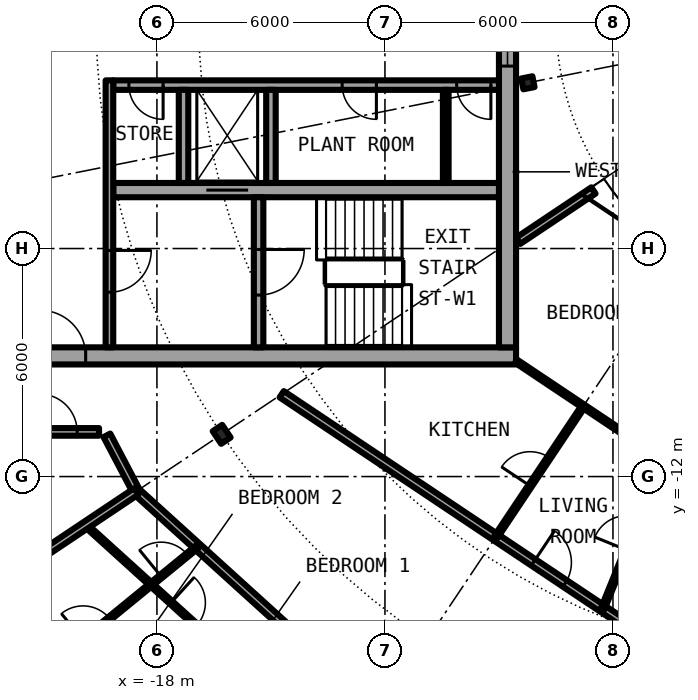
"""IFC4 building model, lengths in metres.
Left out: names, types, materials, properties, quantities, classifications, styles, units other than length and angle.
Written with IfcOpenShell. Run it as: python <this file> out.ifc"""

import sys

from ifc_helpers import new_model, si_unit, direction, frame, frame_2d, origin, origin_2d, place, context, subcontext, project, spatial, rectangle, i_section, extrude, element, fill, save


model = new_model("IFC4")
c1 = context("Model", 3, precision=1e-05, world=origin(), true_north=direction((0.0, 1.0)))
c2 = subcontext(c1, "Body", "Model", "MODEL_VIEW")
j1 = project(units=[si_unit("LENGTHUNIT", "METRE"), si_unit("PLANEANGLEUNIT", "RADIAN")], contexts=[c1])
p1 = place(None, origin())
s1 = spatial("IfcSite", under=j1, at=p1, CompositionType="ELEMENT")
p2 = place(p1, origin())
s2 = spatial("IfcBuilding", under=s1, at=p2, CompositionType="ELEMENT")
p3 = place(p2, frame((0.0, 0.0, 190.2)))
s3 = spatial("IfcBuildingStorey", under=s2, at=p3, CompositionType="ELEMENT", Elevation=190.2)
p4 = place(p3, frame((-16.297, -10.889, 0.0), z_axis=(0.0, 0.0, 1.0), x_axis=(-0.831469612303, -0.55557023302, 0.0)))
e1 = element("IfcColumn", 1, at=p4, inside=s3, PredefinedType="COLUMN", context=c2, shape_type="SweptSolid", body=[
    extrude(i_section(OverallWidth=0.3, OverallDepth=0.4, WebThickness=0.013, FlangeThickness=0.024, FilletRadius=0.027, at=origin_2d()), origin(), (0.0, 0.0, 1.0), 3.05),
])
p5 = place(p3, frame((-8.239, -1.639, 0.0), z_axis=(0.0, 0.0, 1.0), x_axis=(-0.980785280403, -0.195090322016, 0.0)))
e2 = element("IfcColumn", 2, at=p5, inside=s3, PredefinedType="COLUMN", context=c2, shape_type="SweptSolid", body=[
    extrude(i_section(OverallWidth=0.3, OverallDepth=0.29, WebThickness=0.009, FlangeThickness=0.014, FilletRadius=0.027, at=origin_2d()), origin(), (0.0, 0.0, 1.0), 3.05),
])
p6 = place(p3, frame((-22.699, -15.167, 0.0), z_axis=(0.0, 0.0, 1.0), x_axis=(0.634382322723, -0.773019449054, 0.0)))
e3 = element("IfcWall", 3, at=p6, inside=s3, PredefinedType="SOLIDWALL", context=c2, shape_type="SweptSolid", body=[
    extrude(rectangle(XDim=5.352, YDim=0.25, at=frame_2d((2.676, 0.0))), origin(), (0.0, 0.0, 1.0), 2.7),
])
p7 = place(p6, frame((0.841, 0.0, 0.0)))
e4 = element("IfcOpeningElement", 4, at=p7, cuts=e3, PredefinedType="OPENING", context=c2, shape_type="SweptSolid", body=[
    extrude(rectangle(XDim=1.0, YDim=2.2, at=frame_2d((0.5, 1.1))), frame((0.0, 0.135, 0.0), z_axis=(0.0, -1.0, 0.0), x_axis=(1.0, 0.0, 0.0)), (0.0, 0.0, 1.0), 0.27),
])
p8 = place(p6, frame((3.111, 0.0, 0.3)))
e5 = element("IfcOpeningElement", 5, at=p8, cuts=e3, PredefinedType="OPENING", context=c2, shape_type="SweptSolid", body=[
    extrude(rectangle(XDim=1.8, YDim=2.1, at=frame_2d((0.9, 1.05))), frame((0.0, 0.135, 0.0), z_axis=(0.0, -1.0, 0.0), x_axis=(1.0, 0.0, 0.0)), (0.0, 0.0, 1.0), 0.27),
])
p9 = place(p3, frame((-22.05, -8.825, 0.0), z_axis=(0.0, 0.0, 1.0), x_axis=(1.0, 0.0, 0.0)))
e6 = element("IfcWall", 6, at=p9, inside=s3, PredefinedType="SHEAR", context=c2, shape_type="SweptSolid", body=[
    extrude(rectangle(XDim=13.5, YDim=0.45, at=frame_2d((6.75, 0.0))), origin(), (0.0, 0.0, 1.0), 3.05),
])
p10 = place(p9, frame((0.975, 0.0, 0.0)))
e7 = element("IfcOpeningElement", 7, at=p10, cuts=e6, PredefinedType="OPENING", context=c2, shape_type="SweptSolid", body=[
    extrude(rectangle(XDim=1.2, YDim=2.3, at=frame_2d((0.6, 1.15))), frame((0.0, 0.235, 0.0), z_axis=(0.0, -1.0, 0.0), x_axis=(1.0, 0.0, 0.0)), (0.0, 0.0, 1.0), 0.47),
])
p11 = place(p3, frame((-8.775, 8.6, 0.0), z_axis=(0.0, 0.0, 1.0), x_axis=(0.0, -1.0, 0.0)))
e8 = element("IfcWall", 8, at=p11, inside=s3, PredefinedType="SHEAR", context=c2, shape_type="SweptSolid", body=[
    extrude(rectangle(XDim=17.2, YDim=0.45, at=frame_2d((8.6, 0.0))), origin(), (0.0, 0.0, 1.0), 3.05),
])
p12 = place(p11, frame((7.4, 0.0, 0.1)))
e9 = element("IfcOpeningElement", 9, at=p12, cuts=e8, PredefinedType="OPENING", context=c2, shape_type="SweptSolid", body=[
    extrude(rectangle(XDim=2.4, YDim=2.2, at=frame_2d((1.2, 1.1))), frame((0.0, 0.235, 0.0), z_axis=(0.0, -1.0, 0.0), x_axis=(1.0, 0.0, 0.0)), (0.0, 0.0, 1.0), 0.47),
])
p13 = place(p3, frame((-9.0, -1.7, 0.0), z_axis=(0.0, 0.0, 1.0), x_axis=(-1.0, 0.0, 0.0)))
e10 = element("IfcWall", 10, at=p13, inside=s3, PredefinedType="SHEAR", context=c2, shape_type="SweptSolid", body=[
    extrude(rectangle(XDim=10.15, YDim=0.25, at=frame_2d((5.075, 0.0))), origin(), (0.0, 0.0, 1.0), 3.05),
])
p14 = place(p13, frame((0.212, 0.0, 0.0)))
e11 = element("IfcOpeningElement", 11, at=p14, cuts=e10, PredefinedType="OPENING", context=c2, shape_type="SweptSolid", body=[
    extrude(rectangle(XDim=0.9, YDim=2.3, at=frame_2d((0.45, 1.15))), frame((0.0, 0.135, 0.0), z_axis=(0.0, -1.0, 0.0), x_axis=(1.0, 0.0, 0.0)), (0.0, 0.0, 1.0), 0.27),
])
p15 = place(p13, frame((3.225, 0.0, 0.0)))
e12 = element("IfcOpeningElement", 12, at=p15, cuts=e10, PredefinedType="OPENING", context=c2, shape_type="SweptSolid", body=[
    extrude(rectangle(XDim=0.9, YDim=2.3, at=frame_2d((0.45, 1.15))), frame((0.0, 0.135, 0.0), z_axis=(0.0, -1.0, 0.0), x_axis=(1.0, 0.0, 0.0)), (0.0, 0.0, 1.0), 0.27),
])
p16 = place(p13, frame((8.837, 0.0, 0.0)))
e13 = element("IfcOpeningElement", 13, at=p16, cuts=e10, PredefinedType="OPENING", context=c2, shape_type="SweptSolid", body=[
    extrude(rectangle(XDim=0.9, YDim=2.3, at=frame_2d((0.45, 1.15))), frame((0.0, 0.135, 0.0), z_axis=(0.0, -1.0, 0.0), x_axis=(1.0, 0.0, 0.0)), (0.0, 0.0, 1.0), 0.27),
])
p17 = place(p3, frame((-9.0, -4.462, 0.0), z_axis=(0.0, 0.0, 1.0), x_axis=(-1.0, 0.0, 0.0)))
e14 = element("IfcWall", 14, at=p17, inside=s3, PredefinedType="SHEAR", context=c2, shape_type="SweptSolid", body=[
    extrude(rectangle(XDim=10.15, YDim=0.375, at=frame_2d((5.075, 0.0))), origin(), (0.0, 0.0, 1.0), 3.05),
])
p18 = place(p17, frame((6.6, 0.0, 0.0)))
e15 = element("IfcOpeningElement", 15, at=p18, cuts=e14, PredefinedType="OPENING", context=c2, shape_type="SweptSolid", body=[
    extrude(rectangle(XDim=1.1, YDim=2.3, at=frame_2d((0.55, 1.15))), frame((0.0, 0.198, 0.0), z_axis=(0.0, -1.0, 0.0), x_axis=(1.0, 0.0, 0.0)), (0.0, 0.0, 1.0), 0.395),
])
p19 = place(p3, frame((-15.325, -4.65, 0.0), z_axis=(0.0, 0.0, 1.0), x_axis=(0.0, -1.0, 0.0)))
e16 = element("IfcWall", 16, at=p19, inside=s3, PredefinedType="SHEAR", context=c2, shape_type="SweptSolid", body=[
    extrude(rectangle(XDim=3.95, YDim=0.25, at=frame_2d((1.975, 0.0))), origin(), (0.0, 0.0, 1.0), 3.05),
])
p20 = place(p19, frame((1.375, 0.0, 0.0)))
e17 = element("IfcOpeningElement", 17, at=p20, cuts=e16, PredefinedType="OPENING", context=c2, shape_type="SweptSolid", body=[
    extrude(rectangle(XDim=1.2, YDim=2.3, at=frame_2d((0.6, 1.15))), frame((0.0, 0.135, 0.0), z_axis=(0.0, -1.0, 0.0), x_axis=(1.0, 0.0, 0.0)), (0.0, 0.0, 1.0), 0.27),
])
for number, where, z_axis, x_axis in (
    (18, (-15.0, -1.825, 0.0), (0.0, 0.0, 1.0), (0.0, -1.0, 0.0)),
    (19, (-17.3, -1.825, 0.0), (0.0, 0.0, 1.0), (0.0, -1.0, 0.0)),
):
    element("IfcWall", number, at=place(p3, frame(where, z_axis=z_axis, x_axis=x_axis)), inside=s3, PredefinedType="SOLIDWALL", context=c2, shape_type="SweptSolid", body=[
        extrude(rectangle(XDim=2.45, YDim=0.25, at=frame_2d((1.225, 0.0))), origin(), (0.0, 0.0, 1.0), 2.7),
    ])
p21 = place(p3, frame((-19.25, -1.575, 0.0), z_axis=(0.0, 0.0, 1.0), x_axis=(0.0, -1.0, 0.0)))
e20 = element("IfcWall", 20, at=p21, inside=s3, PredefinedType="SOLIDWALL", context=c2, shape_type="SweptSolid", body=[
    extrude(rectangle(XDim=7.025, YDim=0.2, at=frame_2d((3.513, 0.0))), origin(), (0.0, 0.0, 1.0), 2.7),
])
p22 = place(p21, frame((4.475, 0.0, 0.0)))
e21 = element("IfcOpeningElement", 21, at=p22, cuts=e20, PredefinedType="OPENING", context=c2, shape_type="SweptSolid", body=[
    extrude(rectangle(XDim=1.1, YDim=2.3, at=frame_2d((0.55, 1.15))), frame((0.0, 0.11, 0.0), z_axis=(0.0, -1.0, 0.0), x_axis=(1.0, 0.0, 0.0)), (0.0, 0.0, 1.0), 0.22),
])
p23 = place(p3, frame((-10.4, -1.825, 0.0), z_axis=(0.0, 0.0, 1.0), x_axis=(0.0, -1.0, 0.0)))
e22 = element("IfcWall", 22, at=p23, inside=s3, PredefinedType="PARTITIONING", context=c2, shape_type="SweptSolid", body=[
    extrude(rectangle(XDim=2.45, YDim=0.15, at=frame_2d((1.225, 0.0))), origin(), (0.0, 0.0, 1.0), 2.7),
])
p24 = place(p3, frame((-19.869, -13.284, 0.0), z_axis=(0.0, 0.0, 1.0), x_axis=(0.741104058203, -0.67139018083, 0.0)))
e23 = element("IfcWall", 23, at=p24, inside=s3, PredefinedType="PARTITIONING", context=c2, shape_type="SweptSolid", body=[
    extrude(rectangle(XDim=6.969, YDim=0.1, at=frame_2d((3.484, 0.0))), origin(), (0.0, 0.0, 1.0), 2.7),
])
p25 = place(p24, frame((3.028, 0.0, 0.0)))
e24 = element("IfcOpeningElement", 24, at=p25, cuts=e23, PredefinedType="OPENING", context=c2, shape_type="SweptSolid", body=[
    extrude(rectangle(XDim=0.9, YDim=2.3, at=frame_2d((0.45, 1.15))), frame((0.0, 0.06, 0.0), z_axis=(0.0, -1.0, 0.0), x_axis=(1.0, 0.0, 0.0)), (0.0, 0.0, 1.0), 0.12),
])
p26 = place(p3, frame((-19.317, -10.915, 0.0), z_axis=(0.0, 0.0, 1.0), x_axis=(0.465359652486, -0.885121683068, 0.0)))
e25 = element("IfcWall", 25, at=p26, inside=s3, PredefinedType="PARTITIONING", context=c2, shape_type="SweptSolid", body=[
    extrude(rectangle(XDim=1.665, YDim=0.2, at=frame_2d((0.833, 0.0))), origin(), (0.0, 0.0, 1.0), 2.7),
])
p27 = place(p3, frame((-18.542, -12.389, 0.0), z_axis=(0.0, 0.0, 1.0), x_axis=(0.74093897184, -0.671572363941, 0.0)))
e26 = element("IfcWall", 26, at=p27, inside=s3, PredefinedType="PARTITIONING", context=c2, shape_type="SweptSolid", body=[
    extrude(rectangle(XDim=10.84, YDim=0.2, at=frame_2d((5.42, 0.0))), origin(), (0.0, 0.0, 1.0), 2.7),
])
p28 = place(p27, frame((6.544, 0.0, 0.0)))
e27 = element("IfcOpeningElement", 27, at=p28, cuts=e26, PredefinedType="OPENING", context=c2, shape_type="SweptSolid", body=[
    extrude(rectangle(XDim=1.0, YDim=2.3, at=frame_2d((0.5, 1.15))), frame((0.0, 0.11, 0.0), z_axis=(0.0, -1.0, 0.0), x_axis=(1.0, 0.0, 0.0)), (0.0, 0.0, 1.0), 0.22),
])
p29 = place(p3, frame((-14.717, -9.834, 0.0), z_axis=(0.0, 0.0, 1.0), x_axis=(0.831492679744, -0.555535708603, 0.0)))
e28 = element("IfcWall", 28, at=p29, inside=s3, PredefinedType="PARTITIONING", context=c2, shape_type="SweptSolid", body=[
    extrude(rectangle(XDim=13.549, YDim=0.2, at=frame_2d((6.775, 0.0))), origin(), (0.0, 0.0, 1.0), 2.7),
])
p30 = place(p29, frame((7.966, 0.0, 0.0)))
e29 = element("IfcOpeningElement", 29, at=p30, cuts=e28, PredefinedType="OPENING", context=c2, shape_type="SweptSolid", body=[
    extrude(rectangle(XDim=1.0, YDim=2.3, at=frame_2d((0.5, 1.15))), frame((0.0, 0.11, 0.0), z_axis=(0.0, -1.0, 0.0), x_axis=(1.0, 0.0, 0.0)), (0.0, 0.0, 1.0), 0.22),
])
p31 = place(p3, frame((-8.549, -8.965, 0.0), z_axis=(0.0, 0.0, 1.0), x_axis=(0.831463102602, -0.555579975352, 0.0)))
e30 = element("IfcWall", 30, at=p31, inside=s3, PredefinedType="PARTITIONING", context=c2, shape_type="SweptSolid", body=[
    extrude(rectangle(XDim=3.393, YDim=0.1, at=frame_2d((1.696, 0.0))), origin(), (0.0, 0.0, 1.0), 2.7),
])
p32 = place(p3, frame((-21.675, -10.825, 0.0), z_axis=(0.0, 0.0, 1.0), x_axis=(1.0, 0.0, 0.0)))
e31 = element("IfcWall", 31, at=p32, inside=s3, PredefinedType="PARTITIONING", context=c2, shape_type="SweptSolid", body=[
    extrude(rectangle(XDim=2.152, YDim=0.2, at=frame_2d((1.076, 0.0))), origin(), (0.0, 0.0, 1.0), 2.7),
])
p33 = place(p32, frame((0.576, 0.0, 0.0)))
e32 = element("IfcOpeningElement", 32, at=p33, cuts=e31, PredefinedType="OPENING", context=c2, shape_type="SweptSolid", body=[
    extrude(rectangle(XDim=1.0, YDim=2.3, at=frame_2d((0.5, 1.15))), frame((0.0, 0.11, 0.0), z_axis=(0.0, -1.0, 0.0), x_axis=(1.0, 0.0, 0.0)), (0.0, 0.0, 1.0), 0.22),
])
p34 = place(p3, frame((-6.513, -4.472, 0.0), z_axis=(0.0, 0.0, 1.0), x_axis=(-0.831403409976, -0.555669299026, 0.0)))
e33 = element("IfcWall", 33, at=p34, inside=s3, PredefinedType="PARTITIONING", context=c2, shape_type="SweptSolid", body=[
    extrude(rectangle(XDim=2.383, YDim=0.2, at=frame_2d((1.191, 0.0))), origin(), (0.0, 0.0, 1.0), 2.7),
])
p35 = place(p3, frame((-22.595, -15.098, 0.0), z_axis=(0.0, 0.0, 1.0), x_axis=(0.831387096605, 0.55569370664, 0.0)))
e34 = element("IfcWall", 34, at=p35, inside=s3, PredefinedType="PARTITIONING", context=c2, shape_type="SweptSolid", body=[
    extrude(rectangle(XDim=4.875, YDim=0.2, at=frame_2d((2.438, 0.0))), origin(), (0.0, 0.0, 1.0), 2.7),
])
p36 = place(p3, frame((-21.04, -17.199, 0.0), z_axis=(0.0, 0.0, 1.0), x_axis=(0.774310172558, 0.632806255241, 0.0)))
e35 = element("IfcWall", 35, at=p36, inside=s3, PredefinedType="PARTITIONING", context=c2, shape_type="SweptSolid", body=[
    extrude(rectangle(XDim=5.3, YDim=0.1, at=frame_2d((2.65, 0.0))), origin(), (0.0, 0.0, 1.0), 2.7),
])
p37 = place(p36, frame((4.066, 0.0, 0.0)))
e36 = element("IfcOpeningElement", 36, at=p37, cuts=e35, PredefinedType="OPENING", context=c2, shape_type="SweptSolid", body=[
    extrude(rectangle(XDim=0.9, YDim=2.3, at=frame_2d((0.45, 1.15))), frame((0.0, 0.06, 0.0), z_axis=(0.0, -1.0, 0.0), x_axis=(1.0, 0.0, 0.0)), (0.0, 0.0, 1.0), 0.12),
])
p38 = place(p36, frame((1.416, 0.0, 0.0)))
e37 = element("IfcOpeningElement", 37, at=p38, cuts=e35, PredefinedType="OPENING", context=c2, shape_type="SweptSolid", body=[
    extrude(rectangle(XDim=0.9, YDim=2.3, at=frame_2d((0.45, 1.15))), frame((0.0, 0.06, 0.0), z_axis=(0.0, -1.0, 0.0), x_axis=(1.0, 0.0, 0.0)), (0.0, 0.0, 1.0), 0.12),
])
p39 = place(p3, frame((-9.085, -13.597, 0.0), z_axis=(0.0, 0.0, 1.0), x_axis=(0.555528237031, 0.831497671591, 0.0)))
e38 = element("IfcWall", 38, at=p39, inside=s3, PredefinedType="PARTITIONING", context=c2, shape_type="SweptSolid", body=[
    extrude(rectangle(XDim=4.149, YDim=0.1, at=frame_2d((2.075, 0.0))), origin(), (0.0, 0.0, 1.0), 2.7),
])
p40 = place(p39, frame((1.625, 0.0, 0.0)))
e39 = element("IfcOpeningElement", 39, at=p40, cuts=e38, PredefinedType="OPENING", context=c2, shape_type="SweptSolid", body=[
    extrude(rectangle(XDim=0.9, YDim=2.3, at=frame_2d((0.45, 1.15))), frame((0.0, 0.06, 0.0), z_axis=(0.0, -1.0, 0.0), x_axis=(1.0, 0.0, 0.0)), (0.0, 0.0, 1.0), 0.12),
])
p41 = place(p3, frame((-6.269, -15.478, 0.0), z_axis=(0.0, 0.0, 1.0), x_axis=(0.375509828455, 0.926818411952, 0.0)))
e40 = element("IfcWall", 40, at=p41, inside=s3, PredefinedType="PARTITIONING", context=c2, shape_type="SweptSolid", body=[
    extrude(rectangle(XDim=4.237, YDim=0.1, at=frame_2d((2.119, 0.0))), origin(), (0.0, 0.0, 1.0), 2.7),
])
p42 = place(p41, frame((1.669, 0.0, 0.0)))
e41 = element("IfcOpeningElement", 41, at=p42, cuts=e40, PredefinedType="OPENING", context=c2, shape_type="SweptSolid", body=[
    extrude(rectangle(XDim=0.9, YDim=2.3, at=frame_2d((0.45, 1.15))), frame((0.0, 0.06, 0.0), z_axis=(0.0, -1.0, 0.0), x_axis=(1.0, 0.0, 0.0)), (0.0, 0.0, 1.0), 0.12),
])
p43 = place(p18, origin())
e42 = element("IfcDoor", 42, at=p43, inside=s3, OperationType="DOUBLE_DOOR_SLIDING", PredefinedType="DOOR", context=c2, shape_type="SweptSolid", body=[
    extrude(rectangle(XDim=1.1, YDim=2.3, at=frame_2d((0.55, 1.15))), frame((0.0, 0.025, 0.0), z_axis=(0.0, -1.0, 0.0), x_axis=(1.0, 0.0, 0.0)), (0.0, 0.0, 1.0), 0.05),
])
fill(e15, e42)
p44 = place(p14, origin())
e43 = element("IfcDoor", 43, at=p44, inside=s3, OperationType="SINGLE_SWING_RIGHT", PredefinedType="DOOR", context=c2, shape_type="SweptSolid", body=[
    extrude(rectangle(XDim=0.9, YDim=2.3, at=frame_2d((0.45, 1.15))), frame((0.0, 0.025, 0.0), z_axis=(0.0, -1.0, 0.0), x_axis=(1.0, 0.0, 0.0)), (0.0, 0.0, 1.0), 0.05),
])
fill(e11, e43)
p45 = place(p15, origin())
e44 = element("IfcDoor", 44, at=p45, inside=s3, OperationType="SINGLE_SWING_RIGHT", PredefinedType="DOOR", context=c2, shape_type="SweptSolid", body=[
    extrude(rectangle(XDim=0.9, YDim=2.3, at=frame_2d((0.45, 1.15))), frame((0.0, 0.025, 0.0), z_axis=(0.0, -1.0, 0.0), x_axis=(1.0, 0.0, 0.0)), (0.0, 0.0, 1.0), 0.05),
])
fill(e12, e44)
p46 = place(p16, origin())
e45 = element("IfcDoor", 45, at=p46, inside=s3, OperationType="SINGLE_SWING_LEFT", PredefinedType="DOOR", context=c2, shape_type="SweptSolid", body=[
    extrude(rectangle(XDim=0.9, YDim=2.3, at=frame_2d((0.45, 1.15))), frame((0.0, 0.025, 0.0), z_axis=(0.0, -1.0, 0.0), x_axis=(1.0, 0.0, 0.0)), (0.0, 0.0, 1.0), 0.05),
])
fill(e13, e45)
p47 = place(p20, origin())
e46 = element("IfcDoor", 46, at=p47, inside=s3, OperationType="SINGLE_SWING_LEFT", PredefinedType="DOOR", context=c2, shape_type="SweptSolid", body=[
    extrude(rectangle(XDim=1.2, YDim=2.3, at=frame_2d((0.6, 1.15))), frame((0.0, 0.025, 0.0), z_axis=(0.0, -1.0, 0.0), x_axis=(1.0, 0.0, 0.0)), (0.0, 0.0, 1.0), 0.05),
])
fill(e17, e46)
p48 = place(p22, origin())
e47 = element("IfcDoor", 47, at=p48, inside=s3, OperationType="SINGLE_SWING_LEFT", PredefinedType="DOOR", context=c2, shape_type="SweptSolid", body=[
    extrude(rectangle(XDim=1.1, YDim=2.3, at=frame_2d((0.55, 1.15))), frame((0.0, 0.025, 0.0), z_axis=(0.0, -1.0, 0.0), x_axis=(1.0, 0.0, 0.0)), (0.0, 0.0, 1.0), 0.05),
])
fill(e21, e47)
p49 = place(p10, origin())
e48 = element("IfcDoor", 48, at=p49, inside=s3, OperationType="SINGLE_SWING_RIGHT", PredefinedType="DOOR", context=c2, shape_type="SweptSolid", body=[
    extrude(rectangle(XDim=1.2, YDim=2.3, at=frame_2d((0.6, 1.15))), frame((0.0, 0.025, 0.0), z_axis=(0.0, -1.0, 0.0), x_axis=(1.0, 0.0, 0.0)), (0.0, 0.0, 1.0), 0.05),
])
fill(e7, e48)
p50 = place(p12, origin())
e49 = element("IfcWindow", 49, at=p50, inside=s3, PartitioningType="SINGLE_PANEL", PredefinedType="WINDOW", context=c2, shape_type="SweptSolid", body=[
    extrude(rectangle(XDim=2.4, YDim=2.2, at=frame_2d((1.2, 1.1))), frame((0.0, 0.03, 0.0), z_axis=(0.0, -1.0, 0.0), x_axis=(1.0, 0.0, 0.0)), (0.0, 0.0, 1.0), 0.06),
])
fill(e9, e49)
p51 = place(p37, origin())
e50 = element("IfcDoor", 50, at=p51, inside=s3, OperationType="SINGLE_SWING_RIGHT", PredefinedType="DOOR", context=c2, shape_type="SweptSolid", body=[
    extrude(rectangle(XDim=0.9, YDim=2.3, at=frame_2d((0.45, 1.15))), frame((0.0, 0.025, 0.0), z_axis=(0.0, -1.0, 0.0), x_axis=(1.0, 0.0, 0.0)), (0.0, 0.0, 1.0), 0.05),
])
fill(e36, e50)
p52 = place(p25, origin())
e51 = element("IfcDoor", 51, at=p52, inside=s3, OperationType="SINGLE_SWING_LEFT", PredefinedType="DOOR", context=c2, shape_type="SweptSolid", body=[
    extrude(rectangle(XDim=0.9, YDim=2.3, at=frame_2d((0.45, 1.15))), frame((0.0, 0.025, 0.0), z_axis=(0.0, -1.0, 0.0), x_axis=(1.0, 0.0, 0.0)), (0.0, 0.0, 1.0), 0.05),
])
fill(e24, e51)
p53 = place(p38, origin())
e52 = element("IfcDoor", 52, at=p53, inside=s3, OperationType="SINGLE_SWING_LEFT", PredefinedType="DOOR", context=c2, shape_type="SweptSolid", body=[
    extrude(rectangle(XDim=0.9, YDim=2.3, at=frame_2d((0.45, 1.15))), frame((0.0, 0.025, 0.0), z_axis=(0.0, -1.0, 0.0), x_axis=(1.0, 0.0, 0.0)), (0.0, 0.0, 1.0), 0.05),
])
fill(e37, e52)
p54 = place(p30, origin())
e53 = element("IfcDoor", 53, at=p54, inside=s3, OperationType="SINGLE_SWING_RIGHT", PredefinedType="DOOR", context=c2, shape_type="SweptSolid", body=[
    extrude(rectangle(XDim=1.0, YDim=2.3, at=frame_2d((0.5, 1.15))), frame((0.0, 0.025, 0.0), z_axis=(0.0, -1.0, 0.0), x_axis=(1.0, 0.0, 0.0)), (0.0, 0.0, 1.0), 0.05),
])
fill(e29, e53)
p55 = place(p40, origin())
e54 = element("IfcDoor", 54, at=p55, inside=s3, OperationType="SINGLE_SWING_LEFT", PredefinedType="DOOR", context=c2, shape_type="SweptSolid", body=[
    extrude(rectangle(XDim=0.9, YDim=2.3, at=frame_2d((0.45, 1.15))), frame((0.0, 0.025, 0.0), z_axis=(0.0, -1.0, 0.0), x_axis=(1.0, 0.0, 0.0)), (0.0, 0.0, 1.0), 0.05),
])
fill(e39, e54)
p56 = place(p33, origin())
e55 = element("IfcDoor", 55, at=p56, inside=s3, OperationType="SINGLE_SWING_LEFT", PredefinedType="DOOR", context=c2, shape_type="SweptSolid", body=[
    extrude(rectangle(XDim=1.0, YDim=2.3, at=frame_2d((0.5, 1.15))), frame((0.0, 0.025, 0.0), z_axis=(0.0, -1.0, 0.0), x_axis=(1.0, 0.0, 0.0)), (0.0, 0.0, 1.0), 0.05),
])
fill(e32, e55)
save(model, sys.argv[1])
